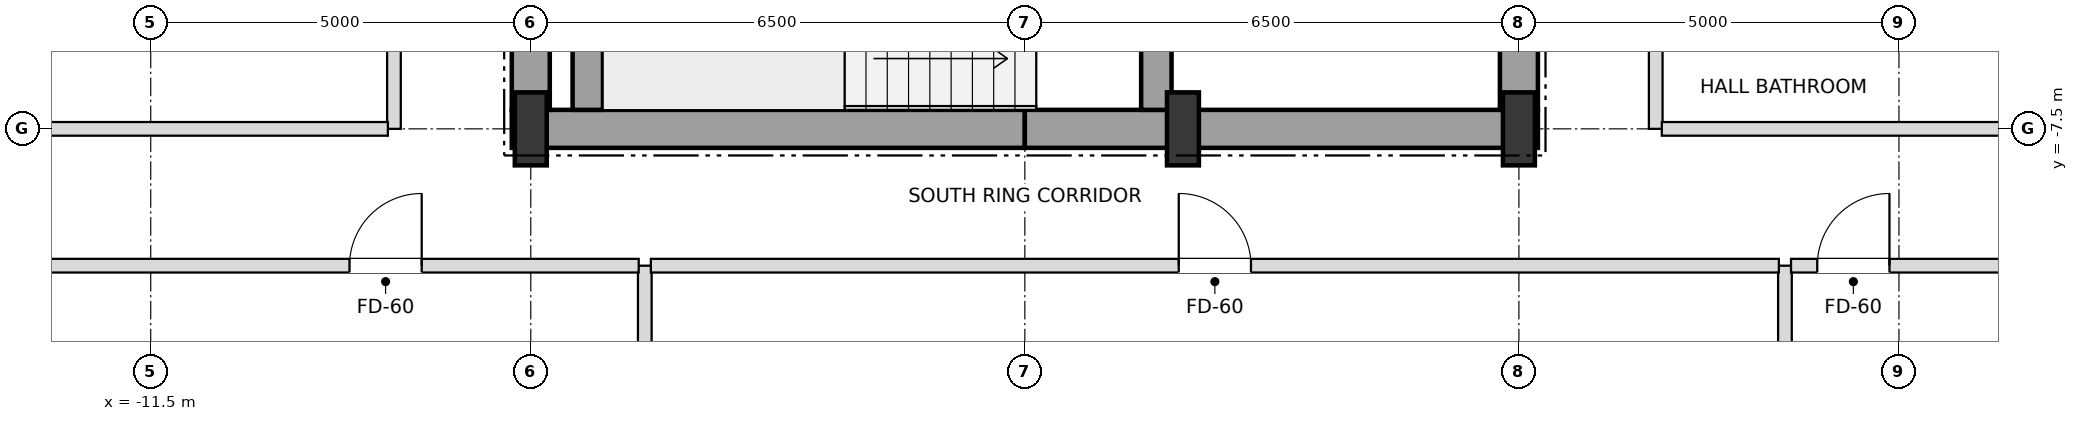
"""IFC4 building model, lengths in metres.
Left out: names, types, materials, properties, quantities, classifications, styles, units other than length and angle.
Written with IfcOpenShell. Run it as: python <this file> out.ifc"""

import sys

from ifc_helpers import new_model, si_unit, direction, frame, frame_2d, origin, origin_2d, place, context, subcontext, project, spatial, rectangle, i_section, extrude, element, fill, save


model = new_model("IFC4")
c1 = context("Model", 3, precision=1e-05, world=origin(), true_north=direction((0.0, 1.0)))
c2 = subcontext(c1, "Body", "Model", "MODEL_VIEW")
j1 = project(units=[si_unit("LENGTHUNIT", "METRE"), si_unit("PLANEANGLEUNIT", "RADIAN")], contexts=[c1])
p1 = place(None, origin())
s1 = spatial("IfcSite", under=j1, at=p1, CompositionType="ELEMENT")
p2 = place(p1, origin())
s2 = spatial("IfcBuilding", under=s1, at=p2, CompositionType="ELEMENT")
p3 = place(p2, frame((0.0, 0.0, 113.4)))
s3 = spatial("IfcBuildingStorey", under=s2, at=p3, CompositionType="ELEMENT", Elevation=113.4)
for number, where, z_axis, x_axis in (
    (1, (-6.5, -7.5, 0.0), (0.0, 0.0, 1.0), (1.0, 0.0, 0.0)),
    (2, (2.08, -7.5, 0.0), (0.0, 0.0, 1.0), (1.0, 0.0, 0.0)),
    (3, (6.5, -7.5, 0.0), (0.0, 0.0, 1.0), (1.0, 0.0, 0.0)),
):
    element("IfcColumn", number, at=place(p3, frame(where, z_axis=z_axis, x_axis=x_axis)), inside=s3, PredefinedType="COLUMN", context=c2, shape_type="SweptSolid", body=[
        extrude(i_section(OverallWidth=0.42, OverallDepth=0.96, WebThickness=0.022, FlangeThickness=0.034, at=origin_2d()), origin(), (0.0, 0.0, 1.0), 3.6),
    ])
for number, where, z_axis, x_axis in (
    (4, (-6.75, -7.5, 0.0), (0.0, 0.0, 1.0), (1.0, 0.0, 0.0)),
    (5, (0.0, -7.5, 0.0), (0.0, 0.0, 1.0), (1.0, 0.0, 0.0)),
):
    element("IfcWall", number, at=place(p3, frame(where, z_axis=z_axis, x_axis=x_axis)), inside=s3, PredefinedType="SHEAR", context=c2, shape_type="SweptSolid", body=[
        extrude(rectangle(XDim=6.75, YDim=0.5, at=frame_2d((3.375, 0.0))), origin(), (0.0, 0.0, 1.0), 3.38),
    ])
p4 = place(p3, frame((-6.5, -7.25, 0.0), z_axis=(0.0, 0.0, 1.0), x_axis=(0.0, 1.0, 0.0)))
e6 = element("IfcWall", 6, at=p4, inside=s3, PredefinedType="SHEAR", context=c2, shape_type="SweptSolid", body=[
    extrude(rectangle(XDim=3.55, YDim=0.5, at=frame_2d((1.775, 0.0))), origin(), (0.0, 0.0, 1.0), 3.38),
])
p5 = place(p3, frame((6.5, -7.25, 0.0), z_axis=(0.0, 0.0, 1.0), x_axis=(0.0, 1.0, 0.0)))
e7 = element("IfcWall", 7, at=p5, inside=s3, PredefinedType="SHEAR", context=c2, shape_type="SweptSolid", body=[
    extrude(rectangle(XDim=5.75, YDim=0.5, at=frame_2d((2.875, 0.0))), origin(), (0.0, 0.0, 1.0), 3.38),
])
p6 = place(p5, frame((0.85, 0.0, 0.0)))
e8 = element("IfcOpeningElement", 8, at=p6, cuts=e7, PredefinedType="OPENING", context=c2, shape_type="SweptSolid", body=[
    extrude(rectangle(XDim=1.05, YDim=2.15, at=frame_2d((0.525, 1.075))), frame((0.0, 0.26, 0.0), z_axis=(0.0, -1.0, 0.0), x_axis=(1.0, 0.0, 0.0)), (0.0, 0.0, 1.0), 0.52),
])
p7 = place(p3, frame((-5.75, -7.25, 0.0), z_axis=(0.0, 0.0, 1.0), x_axis=(0.0, 1.0, 0.0)))
e9 = element("IfcWall", 9, at=p7, inside=s3, PredefinedType="SHEAR", context=c2, shape_type="SweptSolid", body=[
    extrude(rectangle(XDim=2.9, YDim=0.4, at=frame_2d((1.45, 0.0))), origin(), (0.0, 0.0, 1.0), 3.38),
])
p8 = place(p3, frame((1.73, -7.25, 0.0), z_axis=(0.0, 0.0, 1.0), x_axis=(0.0, 1.0, 0.0)))
e10 = element("IfcWall", 10, at=p8, inside=s3, PredefinedType="SHEAR", context=c2, shape_type="SweptSolid", body=[
    extrude(rectangle(XDim=3.3, YDim=0.4, at=frame_2d((1.65, 0.0))), origin(), (0.0, 0.0, 1.0), 3.38),
])
p9 = place(p8, frame((0.9, 0.0, 0.0)))
e11 = element("IfcOpeningElement", 11, at=p9, cuts=e10, PredefinedType="OPENING", context=c2, shape_type="SweptSolid", body=[
    extrude(rectangle(XDim=1.05, YDim=2.15, at=frame_2d((0.525, 1.075))), frame((0.0, 0.21, 0.0), z_axis=(0.0, -1.0, 0.0), x_axis=(1.0, 0.0, 0.0)), (0.0, 0.0, 1.0), 0.42),
])
p10 = place(p3, frame((-8.3, -7.5, 0.0), z_axis=(0.0, 0.0, 1.0), x_axis=(0.0, 1.0, 0.0)))
e12 = element("IfcWall", 12, at=p10, inside=s3, PredefinedType="PARTITIONING", context=c2, shape_type="SweptSolid", body=[
    extrude(rectangle(XDim=15.0, YDim=0.18, at=frame_2d((7.5, 0.0))), origin(), (0.0, 0.0, 1.0), 3.38),
])
p11 = place(p10, frame((2.075, 0.0, 0.0)))
e13 = element("IfcOpeningElement", 13, at=p11, cuts=e12, PredefinedType="OPENING", context=c2, shape_type="SweptSolid", body=[
    extrude(rectangle(XDim=0.95, YDim=2.15, at=frame_2d((0.475, 1.075))), frame((0.0, 0.1, 0.0), z_axis=(0.0, -1.0, 0.0), x_axis=(1.0, 0.0, 0.0)), (0.0, 0.0, 1.0), 0.2),
])
p12 = place(p10, frame((8.475, 0.0, 0.0)))
e14 = element("IfcOpeningElement", 14, at=p12, cuts=e12, PredefinedType="OPENING", context=c2, shape_type="SweptSolid", body=[
    extrude(rectangle(XDim=0.95, YDim=2.15, at=frame_2d((0.475, 1.075))), frame((0.0, 0.1, 0.0), z_axis=(0.0, -1.0, 0.0), x_axis=(1.0, 0.0, 0.0)), (0.0, 0.0, 1.0), 0.2),
])
p13 = place(p10, frame((13.425, 0.0, 0.0)))
e15 = element("IfcOpeningElement", 15, at=p13, cuts=e12, PredefinedType="OPENING", context=c2, shape_type="SweptSolid", body=[
    extrude(rectangle(XDim=0.95, YDim=2.15, at=frame_2d((0.475, 1.075))), frame((0.0, 0.1, 0.0), z_axis=(0.0, -1.0, 0.0), x_axis=(1.0, 0.0, 0.0)), (0.0, 0.0, 1.0), 0.2),
])
p14 = place(p3, frame((-5.0, -23.15, 0.0), z_axis=(0.0, 0.0, 1.0), x_axis=(0.0, 1.0, 0.0)))
e16 = element("IfcWall", 16, at=p14, inside=s3, PredefinedType="PARTITIONING", context=c2, shape_type="SweptSolid", body=[
    extrude(rectangle(XDim=13.85, YDim=0.18, at=frame_2d((6.925, 0.0))), origin(), (0.0, 0.0, 1.0), 2.816),
])
p15 = place(p3, frame((8.3, -7.5, 0.0), z_axis=(0.0, 0.0, 1.0), x_axis=(0.0, 1.0, 0.0)))
e17 = element("IfcWall", 17, at=p15, inside=s3, PredefinedType="PARTITIONING", context=c2, shape_type="SweptSolid", body=[
    extrude(rectangle(XDim=15.0, YDim=0.18, at=frame_2d((7.5, 0.0))), origin(), (0.0, 0.0, 1.0), 3.38),
])
p16 = place(p15, frame((3.475, 0.0, 0.0)))
e18 = element("IfcOpeningElement", 18, at=p16, cuts=e17, PredefinedType="OPENING", context=c2, shape_type="SweptSolid", body=[
    extrude(rectangle(XDim=0.95, YDim=2.15, at=frame_2d((0.475, 1.075))), frame((0.0, 0.1, 0.0), z_axis=(0.0, -1.0, 0.0), x_axis=(1.0, 0.0, 0.0)), (0.0, 0.0, 1.0), 0.2),
])
p17 = place(p3, frame((10.0, -23.15, 0.0), z_axis=(0.0, 0.0, 1.0), x_axis=(0.0, 1.0, 0.0)))
e19 = element("IfcWall", 19, at=p17, inside=s3, PredefinedType="PARTITIONING", context=c2, shape_type="SweptSolid", body=[
    extrude(rectangle(XDim=13.85, YDim=0.18, at=frame_2d((6.925, 0.0))), origin(), (0.0, 0.0, 1.0), 2.816),
])
p18 = place(p17, frame((4.855, 0.0, 0.0)))
e20 = element("IfcOpeningElement", 20, at=p18, cuts=e19, PredefinedType="OPENING", context=c2, shape_type="SweptSolid", body=[
    extrude(rectangle(XDim=0.95, YDim=2.15, at=frame_2d((0.475, 1.075))), frame((0.0, 0.1, 0.0), z_axis=(0.0, -1.0, 0.0), x_axis=(1.0, 0.0, 0.0)), (0.0, 0.0, 1.0), 0.2),
])
p19 = place(p3, frame((-15.65, -9.3, 0.0), z_axis=(0.0, 0.0, 1.0), x_axis=(1.0, 0.0, 0.0)))
e21 = element("IfcWall", 21, at=p19, inside=s3, PredefinedType="PARTITIONING", context=c2, shape_type="SweptSolid", body=[
    extrude(rectangle(XDim=10.57, YDim=0.18, at=frame_2d((5.285, 0.0))), origin(), (0.0, 0.0, 1.0), 2.816),
])
p20 = place(p19, frame((6.765, 0.0, 0.0)))
e22 = element("IfcOpeningElement", 22, at=p20, cuts=e21, PredefinedType="OPENING", context=c2, shape_type="SweptSolid", body=[
    extrude(rectangle(XDim=0.95, YDim=2.15, at=frame_2d((0.475, 1.075))), frame((0.0, 0.1, 0.0), z_axis=(0.0, -1.0, 0.0), x_axis=(1.0, 0.0, 0.0)), (0.0, 0.0, 1.0), 0.2),
])
p21 = place(p3, frame((-4.92, -9.3, 0.0), z_axis=(0.0, 0.0, 1.0), x_axis=(1.0, 0.0, 0.0)))
e23 = element("IfcWall", 23, at=p21, inside=s3, PredefinedType="PARTITIONING", context=c2, shape_type="SweptSolid", body=[
    extrude(rectangle(XDim=14.84, YDim=0.18, at=frame_2d((7.42, 0.0))), origin(), (0.0, 0.0, 1.0), 2.816),
])
p22 = place(p21, frame((6.945, 0.0, 0.0)))
e24 = element("IfcOpeningElement", 24, at=p22, cuts=e23, PredefinedType="OPENING", context=c2, shape_type="SweptSolid", body=[
    extrude(rectangle(XDim=0.95, YDim=2.15, at=frame_2d((0.475, 1.075))), frame((0.0, 0.1, 0.0), z_axis=(0.0, -1.0, 0.0), x_axis=(1.0, 0.0, 0.0)), (0.0, 0.0, 1.0), 0.2),
])
p23 = place(p3, frame((10.08, -9.3, 0.0), z_axis=(0.0, 0.0, 1.0), x_axis=(1.0, 0.0, 0.0)))
e25 = element("IfcWall", 25, at=p23, inside=s3, PredefinedType="PARTITIONING", context=c2, shape_type="SweptSolid", body=[
    extrude(rectangle(XDim=5.49, YDim=0.18, at=frame_2d((2.745, 0.0))), origin(), (0.0, 0.0, 1.0), 3.38),
])
p24 = place(p23, frame((0.345, 0.0, 0.0)))
e26 = element("IfcOpeningElement", 26, at=p24, cuts=e25, PredefinedType="OPENING", context=c2, shape_type="SweptSolid", body=[
    extrude(rectangle(XDim=0.95, YDim=2.15, at=frame_2d((0.475, 1.075))), frame((0.0, 0.1, 0.0), z_axis=(0.0, -1.0, 0.0), x_axis=(1.0, 0.0, 0.0)), (0.0, 0.0, 1.0), 0.2),
])
p25 = place(p3, frame((-20.15, -7.5, 0.0), z_axis=(0.0, 0.0, 1.0), x_axis=(1.0, 0.0, 0.0)))
e27 = element("IfcWall", 27, at=p25, inside=s3, PredefinedType="PARTITIONING", context=c2, shape_type="SweptSolid", body=[
    extrude(rectangle(XDim=11.77, YDim=0.18, at=frame_2d((5.885, 0.0))), origin(), (0.0, 0.0, 1.0), 2.816),
])
p26 = place(p3, frame((8.38, -7.5, 0.0), z_axis=(0.0, 0.0, 1.0), x_axis=(1.0, 0.0, 0.0)))
e28 = element("IfcWall", 28, at=p26, inside=s3, PredefinedType="PARTITIONING", context=c2, shape_type="SweptSolid", body=[
    extrude(rectangle(XDim=5.89, YDim=0.18, at=frame_2d((2.945, 0.0))), origin(), (0.0, 0.0, 1.0), 2.816),
])
p27 = place(p24, origin())
e29 = element("IfcDoor", 29, at=p27, inside=s3, OperationType="SINGLE_SWING_RIGHT", PredefinedType="DOOR", context=c2, shape_type="SweptSolid", body=[
    extrude(rectangle(XDim=0.95, YDim=2.15, at=frame_2d((0.475, 1.075))), frame((0.0, 0.025, 0.0), z_axis=(0.0, -1.0, 0.0), x_axis=(1.0, 0.0, 0.0)), (0.0, 0.0, 1.0), 0.05),
])
fill(e26, e29)
p28 = place(p20, origin())
e30 = element("IfcDoor", 30, at=p28, inside=s3, OperationType="SINGLE_SWING_RIGHT", PredefinedType="DOOR", context=c2, shape_type="SweptSolid", body=[
    extrude(rectangle(XDim=0.95, YDim=2.15, at=frame_2d((0.475, 1.075))), frame((0.0, 0.025, 0.0), z_axis=(0.0, -1.0, 0.0), x_axis=(1.0, 0.0, 0.0)), (0.0, 0.0, 1.0), 0.05),
])
fill(e22, e30)
p29 = place(p22, origin())
e31 = element("IfcDoor", 31, at=p29, inside=s3, OperationType="SINGLE_SWING_LEFT", PredefinedType="DOOR", context=c2, shape_type="SweptSolid", body=[
    extrude(rectangle(XDim=0.95, YDim=2.15, at=frame_2d((0.475, 1.075))), frame((0.0, 0.025, 0.0), z_axis=(0.0, -1.0, 0.0), x_axis=(1.0, 0.0, 0.0)), (0.0, 0.0, 1.0), 0.05),
])
fill(e24, e31)
save(model, sys.argv[1])
